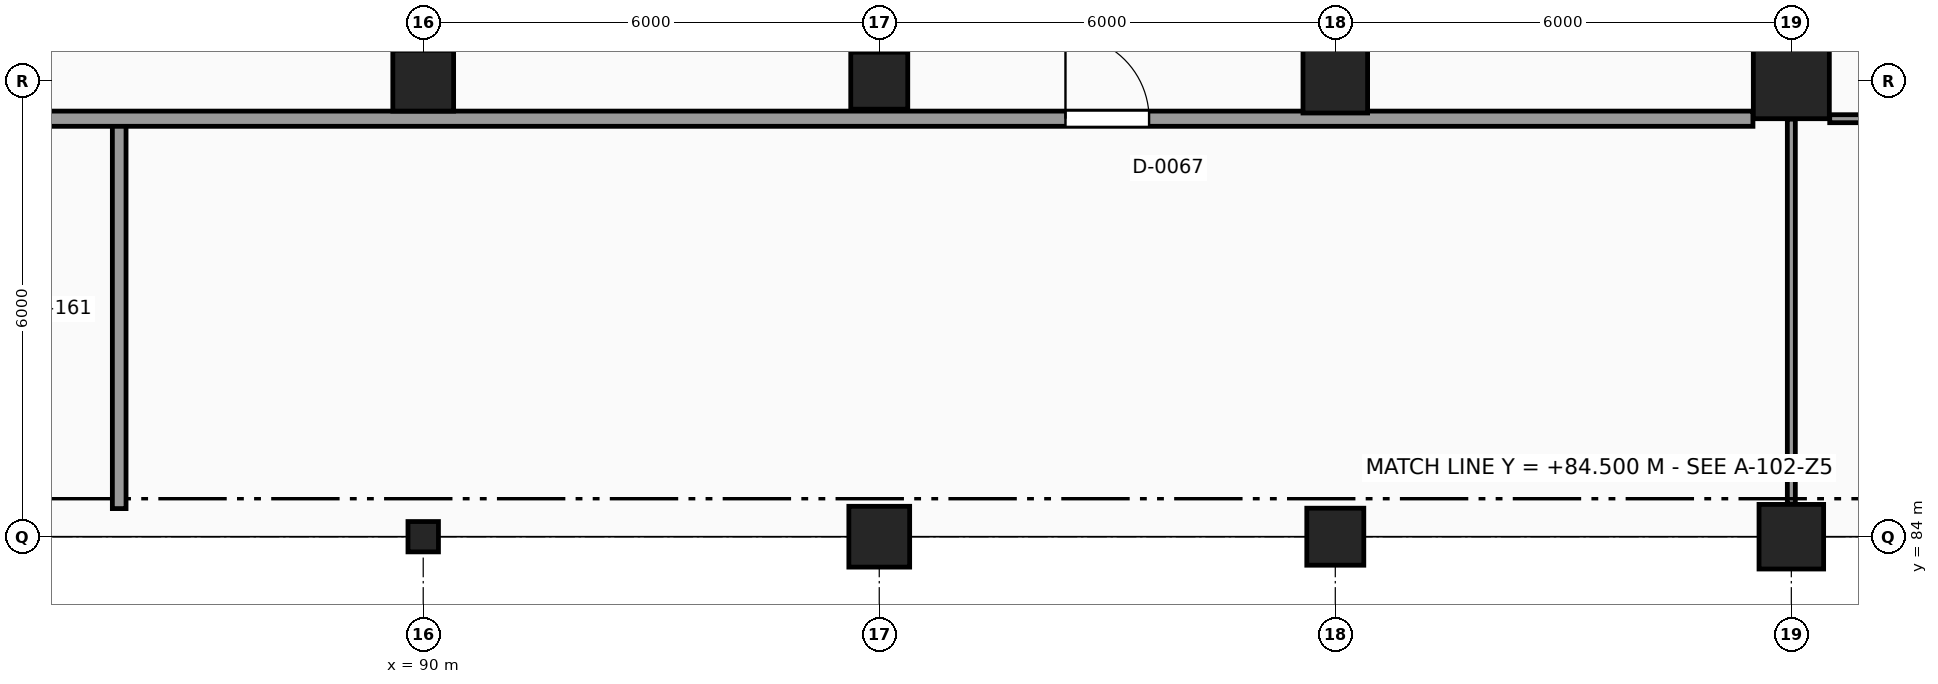
"""IFC4 building model, lengths in metres.
Left out: names, types, materials, properties, quantities, classifications, styles, units other than length and angle.
Written with IfcOpenShell. Run it as: python <this file> out.ifc"""

import sys

from ifc_helpers import new_model, si_unit, direction, frame, frame_2d, origin, origin_2d, place, context, subcontext, project, spatial, rectangle, circle, i_section, extrude, element, fill, save


model = new_model("IFC4")
c1 = context("Model", 3, precision=1e-05, world=origin(), true_north=direction((0.0, 1.0)))
c2 = subcontext(c1, "Body", "Model", "MODEL_VIEW")
j1 = project(units=[si_unit("LENGTHUNIT", "METRE"), si_unit("PLANEANGLEUNIT", "RADIAN")], contexts=[c1])
p1 = place(None, origin())
s1 = spatial("IfcSite", under=j1, at=p1, CompositionType="ELEMENT")
p2 = place(p1, origin())
s2 = spatial("IfcBuilding", under=s1, at=p2, CompositionType="ELEMENT")
p3 = place(p2, frame((0.0, 0.0, 6.0)))
s3 = spatial("IfcBuildingStorey", under=s2, at=p3, CompositionType="ELEMENT", Elevation=6.0)
p4 = place(p3, frame((90.0, 84.0, 0.0), z_axis=(0.0, 0.0, 1.0), x_axis=(1.0, 0.0, 0.0)))
e1 = element("IfcColumn", 1, at=p4, inside=s3, PredefinedType="COLUMN", context=c2, shape_type="SweptSolid", body=[
    extrude(i_section(OverallWidth=0.401, OverallDepth=0.399, WebThickness=0.019, FlangeThickness=0.03, FilletRadius=0.015, at=origin_2d()), origin(), (0.0, 0.0, 1.0), 4.5),
])
for number, where, z_axis, x_axis in (
    (2, (90.0, 90.0, 0.0), (0.0, 0.0, 1.0), (1.0, 0.0, 0.0)),
    (3, (96.0, 84.0, 0.0), (0.0, 0.0, 1.0), (1.0, 0.0, 0.0)),
):
    element("IfcColumn", number, at=place(p3, frame(where, z_axis=z_axis, x_axis=x_axis)), inside=s3, PredefinedType="COLUMN", context=c2, shape_type="SweptSolid", body=[
        extrude(rectangle(XDim=0.8, YDim=0.8, at=origin_2d()), origin(), (0.0, 0.0, 1.0), 4.5),
    ])
for number, where, z_axis, x_axis in (
    (4, (96.0, 90.0, 0.0), (0.0, 0.0, 1.0), (1.0, 0.0, 0.0)),
    (5, (102.0, 84.0, 0.0), (0.0, 0.0, 1.0), (1.0, 0.0, 0.0)),
):
    element("IfcColumn", number, at=place(p3, frame(where, z_axis=z_axis, x_axis=x_axis)), inside=s3, PredefinedType="COLUMN", context=c2, shape_type="SweptSolid", body=[
        extrude(rectangle(XDim=0.75, YDim=0.75, at=origin_2d()), origin(), (0.0, 0.0, 1.0), 4.5),
    ])
for number, where, z_axis, x_axis in (
    (6, (102.0, 90.0, 0.0), (0.0, 0.0, 1.0), (1.0, 0.0, 0.0)),
    (7, (108.0, 84.0, 0.0), (0.0, 0.0, 1.0), (1.0, 0.0, 0.0)),
):
    element("IfcColumn", number, at=place(p3, frame(where, z_axis=z_axis, x_axis=x_axis)), inside=s3, PredefinedType="COLUMN", context=c2, shape_type="SweptSolid", body=[
        extrude(circle(Radius=0.425, at=origin_2d()), origin(), (0.0, 0.0, 1.0), 4.5),
    ])
p5 = place(p3, frame((108.0, 90.0, 0.0), z_axis=(0.0, 0.0, 1.0), x_axis=(1.0, 0.0, 0.0)))
e8 = element("IfcColumn", 8, at=p5, inside=s3, PredefinedType="COLUMN", context=c2, shape_type="SweptSolid", body=[
    extrude(circle(Radius=0.5, at=origin_2d()), origin(), (0.0, 0.0, 1.0), 4.5),
])
p6 = place(p3, frame((86.0, 84.37, 0.0), z_axis=(0.0, 0.0, 1.0), x_axis=(0.0, 1.0, 0.0)))
e9 = element("IfcWall", 9, at=p6, inside=s3, PredefinedType="PARTITIONING", context=c2, shape_type="SweptSolid", body=[
    extrude(rectangle(XDim=5.13, YDim=0.18, at=frame_2d((2.565, 0.0))), origin(), (0.0, 0.0, 1.0), 4.22),
])
p7 = place(p3, frame((108.0, 84.43, 0.0), z_axis=(0.0, 0.0, 1.0), x_axis=(0.0, 1.0, 0.0)))
e10 = element("IfcWall", 10, at=p7, inside=s3, PredefinedType="PARTITIONING", context=c2, shape_type="SweptSolid", body=[
    extrude(rectangle(XDim=5.065, YDim=0.105, at=frame_2d((2.533, 0.0))), origin(), (0.0, 0.0, 1.0), 3.52),
])
p8 = place(p3, frame((78.505, 89.5, 0.0), z_axis=(0.0, 0.0, 1.0), x_axis=(1.0, 0.0, 0.0)))
e11 = element("IfcWall", 11, at=p8, inside=s3, PredefinedType="PARTITIONING", context=c2, shape_type="SweptSolid", body=[
    extrude(rectangle(XDim=28.99, YDim=0.2, at=frame_2d((14.495, 0.0))), origin(), (0.0, 0.0, 1.0), 4.22),
])
p9 = place(p8, frame((19.945, 0.0, 0.0)))
e12 = element("IfcOpeningElement", 12, at=p9, cuts=e11, PredefinedType="OPENING", context=c2, shape_type="SweptSolid", body=[
    extrude(rectangle(XDim=1.1, YDim=2.15, at=frame_2d((0.55, 1.075))), frame((0.0, 0.11, 0.0), z_axis=(0.0, -1.0, 0.0), x_axis=(1.0, 0.0, 0.0)), (0.0, 0.0, 1.0), 0.22),
])
p10 = place(p3, frame((108.505, 89.5, 0.0), z_axis=(0.0, 0.0, 1.0), x_axis=(1.0, 0.0, 0.0)))
e13 = element("IfcWall", 13, at=p10, inside=s3, PredefinedType="PARTITIONING", context=c2, shape_type="SweptSolid", body=[
    extrude(rectangle(XDim=28.99, YDim=0.105, at=frame_2d((14.495, 0.0))), origin(), (0.0, 0.0, 1.0), 4.22),
])
p11 = place(p10, frame((13.945, 0.0, 0.0)))
e14 = element("IfcOpeningElement", 14, at=p11, cuts=e13, PredefinedType="OPENING", context=c2, shape_type="SweptSolid", body=[
    extrude(rectangle(XDim=1.1, YDim=2.15, at=frame_2d((0.55, 1.075))), frame((0.0, 0.062, 0.0), z_axis=(0.0, -1.0, 0.0), x_axis=(1.0, 0.0, 0.0)), (0.0, 0.0, 1.0), 0.125),
])
p12 = place(p9, origin())
e15 = element("IfcDoor", 15, at=p12, inside=s3, OperationType="SINGLE_SWING_LEFT", PredefinedType="DOOR", context=c2, shape_type="SweptSolid", body=[
    extrude(rectangle(XDim=1.1, YDim=2.15, at=frame_2d((0.55, 1.075))), frame((0.0, 0.025, 0.0), z_axis=(0.0, -1.0, 0.0), x_axis=(1.0, 0.0, 0.0)), (0.0, 0.0, 1.0), 0.05),
])
fill(e12, e15)
save(model, sys.argv[1])
